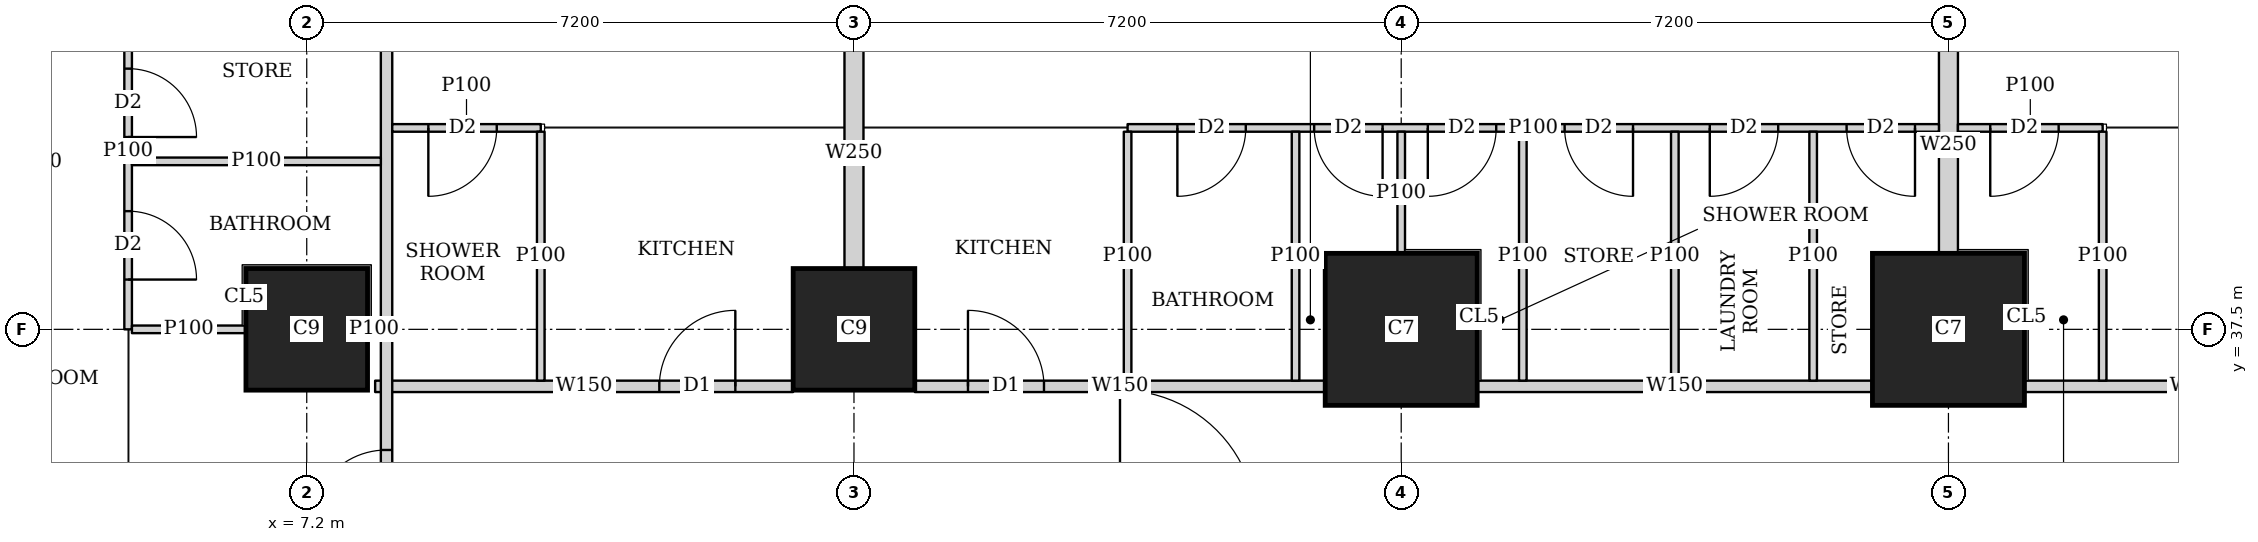
"""IFC4 building model, lengths in metres.
Left out: names, types, materials, properties, quantities, classifications, styles, units other than length and angle.
Written with IfcOpenShell. Run it as: python <this file> out.ifc"""

import sys

from ifc_helpers import new_model, si_unit, direction, frame, frame_2d, origin, origin_2d, place, context, subcontext, project, spatial, rectangle, extrude, element, fill, save


model = new_model("IFC4")
c1 = context("Model", 3, precision=1e-05, world=origin(), true_north=direction((0.0, 1.0)))
c2 = subcontext(c1, "Body", "Model", "MODEL_VIEW")
j1 = project(units=[si_unit("LENGTHUNIT", "METRE"), si_unit("PLANEANGLEUNIT", "RADIAN")], contexts=[c1])
p1 = place(None, origin())
s1 = spatial("IfcSite", under=j1, at=p1, CompositionType="ELEMENT")
p2 = place(p1, origin())
s2 = spatial("IfcBuilding", under=s1, at=p2, CompositionType="ELEMENT")
p3 = place(p2, frame((0.0, 0.0, 77.9)))
s3 = spatial("IfcBuildingStorey", under=s2, at=p3, CompositionType="ELEMENT", Elevation=77.9)
for number, where, z_axis, x_axis in (
    (1, (7.2, 37.5, 0.0), (0.0, 0.0, 1.0), (1.0, 0.0, 0.0)),
    (2, (14.4, 37.5, 0.0), (0.0, 0.0, 1.0), (1.0, 0.0, 0.0)),
):
    element("IfcColumn", number, at=place(p3, frame(where, z_axis=z_axis, x_axis=x_axis)), inside=s3, PredefinedType="COLUMN", context=c2, shape_type="SweptSolid", body=[
        extrude(rectangle(XDim=1.6, YDim=1.6, at=origin_2d()), origin(), (0.0, 0.0, 1.0), 3.75),
    ])
for number, where, z_axis, x_axis in (
    (3, (21.6, 37.5, 0.0), (0.0, 0.0, 1.0), (1.0, 0.0, 0.0)),
    (4, (28.8, 37.5, 0.0), (0.0, 0.0, 1.0), (1.0, 0.0, 0.0)),
):
    element("IfcColumn", number, at=place(p3, frame(where, z_axis=z_axis, x_axis=x_axis)), inside=s3, PredefinedType="COLUMN", context=c2, shape_type="SweptSolid", body=[
        extrude(rectangle(XDim=2.0, YDim=2.0, at=origin_2d()), origin(), (0.0, 0.0, 1.0), 3.75),
    ])
p4 = place(p3, frame((8.25, 2.126, 0.0), z_axis=(0.0, 0.0, 1.0), x_axis=(0.0, 1.0, 0.0)))
e5 = element("IfcWall", 5, at=p4, inside=s3, PredefinedType="SOLIDWALL", context=c2, shape_type="SweptSolid", body=[
    extrude(rectangle(XDim=40.773, YDim=0.15, at=frame_2d((20.386, 0.0))), origin(), (0.0, 0.0, 1.0), 3.5),
])
p5 = place(p4, frame((17.787, 0.0, 0.0)))
e6 = element("IfcOpeningElement", 6, at=p5, cuts=e5, PredefinedType="OPENING", context=c2, shape_type="SweptSolid", body=[
    extrude(rectangle(XDim=1.0, YDim=2.1, at=frame_2d((0.5, 1.05))), frame((0.0, 0.085, 0.0), z_axis=(0.0, -1.0, 0.0), x_axis=(1.0, 0.0, 0.0)), (0.0, 0.0, 1.0), 0.17),
])
p6 = place(p4, frame((21.962, 0.0, 0.0)))
e7 = element("IfcOpeningElement", 7, at=p6, cuts=e5, PredefinedType="OPENING", context=c2, shape_type="SweptSolid", body=[
    extrude(rectangle(XDim=1.0, YDim=2.1, at=frame_2d((0.5, 1.05))), frame((0.0, 0.085, 0.0), z_axis=(0.0, -1.0, 0.0), x_axis=(1.0, 0.0, 0.0)), (0.0, 0.0, 1.0), 0.17),
])
p7 = place(p4, frame((32.787, 0.0, 0.0)))
e8 = element("IfcOpeningElement", 8, at=p7, cuts=e5, PredefinedType="OPENING", context=c2, shape_type="SweptSolid", body=[
    extrude(rectangle(XDim=1.0, YDim=2.1, at=frame_2d((0.5, 1.05))), frame((0.0, 0.085, 0.0), z_axis=(0.0, -1.0, 0.0), x_axis=(1.0, 0.0, 0.0)), (0.0, 0.0, 1.0), 0.17),
])
p8 = place(p3, frame((8.1, 36.75, 0.0), z_axis=(0.0, 0.0, 1.0), x_axis=(1.0, 0.0, 0.0)))
e9 = element("IfcWall", 9, at=p8, inside=s3, PredefinedType="SOLIDWALL", context=c2, shape_type="SweptSolid", body=[
    extrude(rectangle(XDim=5.499, YDim=0.15, at=frame_2d((2.75, 0.0))), origin(), (0.0, 0.0, 1.0), 3.5),
])
p9 = place(p8, frame((3.739, 0.0, 0.0)))
e10 = element("IfcOpeningElement", 10, at=p9, cuts=e9, PredefinedType="OPENING", context=c2, shape_type="SweptSolid", body=[
    extrude(rectangle(XDim=1.0, YDim=2.1, at=frame_2d((0.5, 1.05))), frame((0.0, 0.085, 0.0), z_axis=(0.0, -1.0, 0.0), x_axis=(1.0, 0.0, 0.0)), (0.0, 0.0, 1.0), 0.17),
])
p10 = place(p3, frame((15.201, 36.75, 0.0), z_axis=(0.0, 0.0, 1.0), x_axis=(1.0, 0.0, 0.0)))
e11 = element("IfcWall", 11, at=p10, inside=s3, PredefinedType="SOLIDWALL", context=c2, shape_type="SweptSolid", body=[
    extrude(rectangle(XDim=5.398, YDim=0.15, at=frame_2d((2.699, 0.0))), origin(), (0.0, 0.0, 1.0), 3.5),
])
p11 = place(p10, frame((0.699, 0.0, 0.0)))
e12 = element("IfcOpeningElement", 12, at=p11, cuts=e11, PredefinedType="OPENING", context=c2, shape_type="SweptSolid", body=[
    extrude(rectangle(XDim=1.0, YDim=2.1, at=frame_2d((0.5, 1.05))), frame((0.0, 0.085, 0.0), z_axis=(0.0, -1.0, 0.0), x_axis=(1.0, 0.0, 0.0)), (0.0, 0.0, 1.0), 0.17),
])
p12 = place(p3, frame((22.601, 36.75, 0.0), z_axis=(0.0, 0.0, 1.0), x_axis=(1.0, 0.0, 0.0)))
e13 = element("IfcWall", 13, at=p12, inside=s3, PredefinedType="SOLIDWALL", context=c2, shape_type="SweptSolid", body=[
    extrude(rectangle(XDim=5.198, YDim=0.15, at=frame_2d((2.599, 0.0))), origin(), (0.0, 0.0, 1.0), 3.5),
])
p13 = place(p3, frame((29.801, 36.75, 0.0), z_axis=(0.0, 0.0, 1.0), x_axis=(1.0, 0.0, 0.0)))
e14 = element("IfcWall", 14, at=p13, inside=s3, PredefinedType="SOLIDWALL", context=c2, shape_type="SweptSolid", body=[
    extrude(rectangle(XDim=5.172, YDim=0.15, at=frame_2d((2.586, 0.0))), origin(), (0.0, 0.0, 1.0), 3.5),
])
p14 = place(p13, frame((2.645, 0.0, 0.0)))
e15 = element("IfcOpeningElement", 15, at=p14, cuts=e14, PredefinedType="OPENING", context=c2, shape_type="SweptSolid", body=[
    extrude(rectangle(XDim=1.0, YDim=2.1, at=frame_2d((0.5, 1.05))), frame((0.0, 0.085, 0.0), z_axis=(0.0, -1.0, 0.0), x_axis=(1.0, 0.0, 0.0)), (0.0, 0.0, 1.0), 0.17),
])
p15 = place(p3, frame((4.85, 37.5, 0.0), z_axis=(0.0, 0.0, 1.0), x_axis=(0.0, 1.0, 0.0)))
e16 = element("IfcWall", 16, at=p15, inside=s3, PredefinedType="PARTITIONING", context=c2, shape_type="SweptSolid", body=[
    extrude(rectangle(XDim=4.699, YDim=0.1, at=frame_2d((2.35, 0.0))), origin(), (0.0, 0.0, 1.0), 3.5),
])
p16 = place(p15, frame((0.655, 0.0, 0.0)))
e17 = element("IfcOpeningElement", 17, at=p16, cuts=e16, PredefinedType="OPENING", context=c2, shape_type="SweptSolid", body=[
    extrude(rectangle(XDim=0.9, YDim=2.1, at=frame_2d((0.45, 1.05))), frame((0.0, 0.06, 0.0), z_axis=(0.0, -1.0, 0.0), x_axis=(1.0, 0.0, 0.0)), (0.0, 0.0, 1.0), 0.12),
])
p17 = place(p15, frame((2.53, 0.0, 0.0)))
e18 = element("IfcOpeningElement", 18, at=p17, cuts=e16, PredefinedType="OPENING", context=c2, shape_type="SweptSolid", body=[
    extrude(rectangle(XDim=0.9, YDim=2.1, at=frame_2d((0.45, 1.05))), frame((0.0, 0.06, 0.0), z_axis=(0.0, -1.0, 0.0), x_axis=(1.0, 0.0, 0.0)), (0.0, 0.0, 1.0), 0.12),
])
p18 = place(p3, frame((4.9, 37.5, 0.0), z_axis=(0.0, 0.0, 1.0), x_axis=(1.0, 0.0, 0.0)))
e19 = element("IfcWall", 19, at=p18, inside=s3, PredefinedType="PARTITIONING", context=c2, shape_type="SweptSolid", body=[
    extrude(rectangle(XDim=1.499, YDim=0.1, at=frame_2d((0.75, 0.0))), origin(), (0.0, 0.0, 1.0), 3.5),
])
p19 = place(p3, frame((8.001, 37.5, 0.0), z_axis=(0.0, 0.0, 1.0), x_axis=(1.0, 0.0, 0.0)))
e20 = element("IfcWall", 20, at=p19, inside=s3, PredefinedType="PARTITIONING", context=c2, shape_type="SweptSolid", body=[
    extrude(rectangle(XDim=0.174, YDim=0.1, at=frame_2d((0.087, 0.0))), origin(), (0.0, 0.0, 1.0), 3.5),
])
p20 = place(p3, frame((4.9, 39.71, 0.0), z_axis=(0.0, 0.0, 1.0), x_axis=(1.0, 0.0, 0.0)))
e21 = element("IfcWall", 21, at=p20, inside=s3, PredefinedType="PARTITIONING", context=c2, shape_type="SweptSolid", body=[
    extrude(rectangle(XDim=3.275, YDim=0.1, at=frame_2d((1.638, 0.0))), origin(), (0.0, 0.0, 1.0), 3.5),
])
p21 = place(p3, frame((8.325, 40.15, 0.0), z_axis=(0.0, 0.0, 1.0), x_axis=(1.0, 0.0, 0.0)))
e22 = element("IfcWall", 22, at=p21, inside=s3, PredefinedType="PARTITIONING", context=c2, shape_type="SweptSolid", body=[
    extrude(rectangle(XDim=1.954, YDim=0.1, at=frame_2d((0.977, 0.0))), origin(), (0.0, 0.0, 1.0), 3.5),
])
p22 = place(p21, frame((0.475, 0.0, 0.0)))
e23 = element("IfcOpeningElement", 23, at=p22, cuts=e22, PredefinedType="OPENING", context=c2, shape_type="SweptSolid", body=[
    extrude(rectangle(XDim=0.9, YDim=2.1, at=frame_2d((0.45, 1.05))), frame((0.0, 0.06, 0.0), z_axis=(0.0, -1.0, 0.0), x_axis=(1.0, 0.0, 0.0)), (0.0, 0.0, 1.0), 0.12),
])
p23 = place(p3, frame((10.279, 36.825, 0.0), z_axis=(0.0, 0.0, 1.0), x_axis=(0.0, 1.0, 0.0)))
e24 = element("IfcWall", 24, at=p23, inside=s3, PredefinedType="PARTITIONING", context=c2, shape_type="SweptSolid", body=[
    extrude(rectangle(XDim=3.275, YDim=0.1, at=frame_2d((1.638, 0.0))), origin(), (0.0, 0.0, 1.0), 3.5),
])
p24 = place(p3, frame((18.0, 40.15, 0.0), z_axis=(0.0, 0.0, 1.0), x_axis=(1.0, 0.0, 0.0)))
e25 = element("IfcWall", 25, at=p24, inside=s3, PredefinedType="PARTITIONING", context=c2, shape_type="SweptSolid", body=[
    extrude(rectangle(XDim=10.675, YDim=0.1, at=frame_2d((5.337, 0.0))), origin(), (0.0, 0.0, 1.0), 3.5),
])
p25 = place(p24, frame((0.655, 0.0, 0.0)))
e26 = element("IfcOpeningElement", 26, at=p25, cuts=e25, PredefinedType="OPENING", context=c2, shape_type="SweptSolid", body=[
    extrude(rectangle(XDim=0.9, YDim=2.1, at=frame_2d((0.45, 1.05))), frame((0.0, 0.06, 0.0), z_axis=(0.0, -1.0, 0.0), x_axis=(1.0, 0.0, 0.0)), (0.0, 0.0, 1.0), 0.12),
])
p26 = place(p24, frame((3.95, 0.0, 0.0)))
e27 = element("IfcOpeningElement", 27, at=p26, cuts=e25, PredefinedType="OPENING", context=c2, shape_type="SweptSolid", body=[
    extrude(rectangle(XDim=0.9, YDim=2.1, at=frame_2d((0.45, 1.05))), frame((0.0, 0.06, 0.0), z_axis=(0.0, -1.0, 0.0), x_axis=(1.0, 0.0, 0.0)), (0.0, 0.0, 1.0), 0.12),
])
p27 = place(p24, frame((7.66, 0.0, 0.0)))
e28 = element("IfcOpeningElement", 28, at=p27, cuts=e25, PredefinedType="OPENING", context=c2, shape_type="SweptSolid", body=[
    extrude(rectangle(XDim=0.9, YDim=2.1, at=frame_2d((0.45, 1.05))), frame((0.0, 0.06, 0.0), z_axis=(0.0, -1.0, 0.0), x_axis=(1.0, 0.0, 0.0)), (0.0, 0.0, 1.0), 0.12),
])
p28 = place(p24, frame((2.455, 0.0, 0.0)))
e29 = element("IfcOpeningElement", 29, at=p28, cuts=e25, PredefinedType="OPENING", context=c2, shape_type="SweptSolid", body=[
    extrude(rectangle(XDim=0.9, YDim=2.1, at=frame_2d((0.45, 1.05))), frame((0.0, 0.06, 0.0), z_axis=(0.0, -1.0, 0.0), x_axis=(1.0, 0.0, 0.0)), (0.0, 0.0, 1.0), 0.12),
])
p29 = place(p24, frame((5.75, 0.0, 0.0)))
e30 = element("IfcOpeningElement", 30, at=p29, cuts=e25, PredefinedType="OPENING", context=c2, shape_type="SweptSolid", body=[
    extrude(rectangle(XDim=0.9, YDim=2.1, at=frame_2d((0.45, 1.05))), frame((0.0, 0.06, 0.0), z_axis=(0.0, -1.0, 0.0), x_axis=(1.0, 0.0, 0.0)), (0.0, 0.0, 1.0), 0.12),
])
p30 = place(p24, frame((9.46, 0.0, 0.0)))
e31 = element("IfcOpeningElement", 31, at=p30, cuts=e25, PredefinedType="OPENING", context=c2, shape_type="SweptSolid", body=[
    extrude(rectangle(XDim=0.9, YDim=2.1, at=frame_2d((0.45, 1.05))), frame((0.0, 0.06, 0.0), z_axis=(0.0, -1.0, 0.0), x_axis=(1.0, 0.0, 0.0)), (0.0, 0.0, 1.0), 0.12),
])
p31 = place(p3, frame((18.0, 36.825, 0.0), z_axis=(0.0, 0.0, 1.0), x_axis=(0.0, 1.0, 0.0)))
e32 = element("IfcWall", 32, at=p31, inside=s3, PredefinedType="PARTITIONING", context=c2, shape_type="SweptSolid", body=[
    extrude(rectangle(XDim=3.275, YDim=0.1, at=frame_2d((1.638, 0.0))), origin(), (0.0, 0.0, 1.0), 3.5),
])
p32 = place(p3, frame((21.6, 38.501, 0.0), z_axis=(0.0, 0.0, 1.0), x_axis=(0.0, 1.0, 0.0)))
e33 = element("IfcWall", 33, at=p32, inside=s3, PredefinedType="PARTITIONING", context=c2, shape_type="SweptSolid", body=[
    extrude(rectangle(XDim=1.599, YDim=0.1, at=frame_2d((0.8, 0.0))), origin(), (0.0, 0.0, 1.0), 3.5),
])
for number, where, z_axis, x_axis in (
    (34, (25.2, 36.825, 0.0), (0.0, 0.0, 1.0), (0.0, 1.0, 0.0)),
    (35, (20.21, 36.825, 0.0), (0.0, 0.0, 1.0), (0.0, 1.0, 0.0)),
    (36, (23.2, 36.825, 0.0), (0.0, 0.0, 1.0), (0.0, 1.0, 0.0)),
    (37, (27.02, 36.825, 0.0), (0.0, 0.0, 1.0), (0.0, 1.0, 0.0)),
):
    element("IfcWall", number, at=place(p3, frame(where, z_axis=z_axis, x_axis=x_axis)), inside=s3, PredefinedType="PARTITIONING", context=c2, shape_type="SweptSolid", body=[
        extrude(rectangle(XDim=3.275, YDim=0.1, at=frame_2d((1.638, 0.0))), origin(), (0.0, 0.0, 1.0), 3.5),
    ])
p33 = place(p3, frame((14.4, 38.301, 0.0), z_axis=(0.0, 0.0, 1.0), x_axis=(0.0, 1.0, 0.0)))
e38 = element("IfcWall", 38, at=p33, inside=s3, PredefinedType="SOLIDWALL", context=c2, shape_type="SweptSolid", body=[
    extrude(rectangle(XDim=3.049, YDim=0.25, at=frame_2d((1.524, 0.0))), origin(), (0.0, 0.0, 1.0), 3.5),
])
p34 = place(p3, frame((28.925, 40.15, 0.0), z_axis=(0.0, 0.0, 1.0), x_axis=(1.0, 0.0, 0.0)))
e39 = element("IfcWall", 39, at=p34, inside=s3, PredefinedType="PARTITIONING", context=c2, shape_type="SweptSolid", body=[
    extrude(rectangle(XDim=1.904, YDim=0.1, at=frame_2d((0.952, 0.0))), origin(), (0.0, 0.0, 1.0), 3.5),
])
p35 = place(p34, frame((0.425, 0.0, 0.0)))
e40 = element("IfcOpeningElement", 40, at=p35, cuts=e39, PredefinedType="OPENING", context=c2, shape_type="SweptSolid", body=[
    extrude(rectangle(XDim=0.9, YDim=2.1, at=frame_2d((0.45, 1.05))), frame((0.0, 0.06, 0.0), z_axis=(0.0, -1.0, 0.0), x_axis=(1.0, 0.0, 0.0)), (0.0, 0.0, 1.0), 0.12),
])
p36 = place(p3, frame((30.829, 36.825, 0.0), z_axis=(0.0, 0.0, 1.0), x_axis=(0.0, 1.0, 0.0)))
e41 = element("IfcWall", 41, at=p36, inside=s3, PredefinedType="PARTITIONING", context=c2, shape_type="SweptSolid", body=[
    extrude(rectangle(XDim=3.275, YDim=0.1, at=frame_2d((1.638, 0.0))), origin(), (0.0, 0.0, 1.0), 3.5),
])
p37 = place(p3, frame((28.8, 38.501, 0.0), z_axis=(0.0, 0.0, 1.0), x_axis=(0.0, 1.0, 0.0)))
e42 = element("IfcWall", 42, at=p37, inside=s3, PredefinedType="SOLIDWALL", context=c2, shape_type="SweptSolid", body=[
    extrude(rectangle(XDim=2.849, YDim=0.25, at=frame_2d((1.425, 0.0))), origin(), (0.0, 0.0, 1.0), 3.5),
])
p38 = place(p16, origin())
e43 = element("IfcDoor", 43, at=p38, inside=s3, OperationType="SINGLE_SWING_RIGHT", PredefinedType="DOOR", context=c2, shape_type="SweptSolid", body=[
    extrude(rectangle(XDim=0.9, YDim=2.1, at=frame_2d((0.45, 1.05))), frame((0.0, 0.025, 0.0), z_axis=(0.0, -1.0, 0.0), x_axis=(1.0, 0.0, 0.0)), (0.0, 0.0, 1.0), 0.05),
])
fill(e17, e43)
p39 = place(p17, origin())
e44 = element("IfcDoor", 44, at=p39, inside=s3, OperationType="SINGLE_SWING_RIGHT", PredefinedType="DOOR", context=c2, shape_type="SweptSolid", body=[
    extrude(rectangle(XDim=0.9, YDim=2.1, at=frame_2d((0.45, 1.05))), frame((0.0, 0.025, 0.0), z_axis=(0.0, -1.0, 0.0), x_axis=(1.0, 0.0, 0.0)), (0.0, 0.0, 1.0), 0.05),
])
fill(e18, e44)
p40 = place(p7, origin())
e45 = element("IfcDoor", 45, at=p40, inside=s3, OperationType="SINGLE_SWING_LEFT", PredefinedType="DOOR", context=c2, shape_type="SweptSolid", body=[
    extrude(rectangle(XDim=1.0, YDim=2.1, at=frame_2d((0.5, 1.05))), frame((0.0, 0.025, 0.0), z_axis=(0.0, -1.0, 0.0), x_axis=(1.0, 0.0, 0.0)), (0.0, 0.0, 1.0), 0.05),
])
fill(e8, e45)
p41 = place(p22, origin())
e46 = element("IfcDoor", 46, at=p41, inside=s3, OperationType="SINGLE_SWING_RIGHT", PredefinedType="DOOR", context=c2, shape_type="SweptSolid", body=[
    extrude(rectangle(XDim=0.9, YDim=2.1, at=frame_2d((0.45, 1.05))), frame((0.0, 0.025, 0.0), z_axis=(0.0, -1.0, 0.0), x_axis=(1.0, 0.0, 0.0)), (0.0, 0.0, 1.0), 0.05),
])
fill(e23, e46)
p42 = place(p9, origin())
e47 = element("IfcDoor", 47, at=p42, inside=s3, OperationType="SINGLE_SWING_RIGHT", PredefinedType="DOOR", context=c2, shape_type="SweptSolid", body=[
    extrude(rectangle(XDim=1.0, YDim=2.1, at=frame_2d((0.5, 1.05))), frame((0.0, 0.025, 0.0), z_axis=(0.0, -1.0, 0.0), x_axis=(1.0, 0.0, 0.0)), (0.0, 0.0, 1.0), 0.05),
])
fill(e10, e47)
p43 = place(p25, origin())
e48 = element("IfcDoor", 48, at=p43, inside=s3, OperationType="SINGLE_SWING_RIGHT", PredefinedType="DOOR", context=c2, shape_type="SweptSolid", body=[
    extrude(rectangle(XDim=0.9, YDim=2.1, at=frame_2d((0.45, 1.05))), frame((0.0, 0.025, 0.0), z_axis=(0.0, -1.0, 0.0), x_axis=(1.0, 0.0, 0.0)), (0.0, 0.0, 1.0), 0.05),
])
fill(e26, e48)
p44 = place(p26, origin())
e49 = element("IfcDoor", 49, at=p44, inside=s3, OperationType="SINGLE_SWING_RIGHT", PredefinedType="DOOR", context=c2, shape_type="SweptSolid", body=[
    extrude(rectangle(XDim=0.9, YDim=2.1, at=frame_2d((0.45, 1.05))), frame((0.0, 0.025, 0.0), z_axis=(0.0, -1.0, 0.0), x_axis=(1.0, 0.0, 0.0)), (0.0, 0.0, 1.0), 0.05),
])
fill(e27, e49)
p45 = place(p27, origin())
e50 = element("IfcDoor", 50, at=p45, inside=s3, OperationType="SINGLE_SWING_RIGHT", PredefinedType="DOOR", context=c2, shape_type="SweptSolid", body=[
    extrude(rectangle(XDim=0.9, YDim=2.1, at=frame_2d((0.45, 1.05))), frame((0.0, 0.025, 0.0), z_axis=(0.0, -1.0, 0.0), x_axis=(1.0, 0.0, 0.0)), (0.0, 0.0, 1.0), 0.05),
])
fill(e28, e50)
p46 = place(p28, origin())
e51 = element("IfcDoor", 51, at=p46, inside=s3, OperationType="SINGLE_SWING_LEFT", PredefinedType="DOOR", context=c2, shape_type="SweptSolid", body=[
    extrude(rectangle(XDim=0.9, YDim=2.1, at=frame_2d((0.45, 1.05))), frame((0.0, 0.025, 0.0), z_axis=(0.0, -1.0, 0.0), x_axis=(1.0, 0.0, 0.0)), (0.0, 0.0, 1.0), 0.05),
])
fill(e29, e51)
p47 = place(p29, origin())
e52 = element("IfcDoor", 52, at=p47, inside=s3, OperationType="SINGLE_SWING_LEFT", PredefinedType="DOOR", context=c2, shape_type="SweptSolid", body=[
    extrude(rectangle(XDim=0.9, YDim=2.1, at=frame_2d((0.45, 1.05))), frame((0.0, 0.025, 0.0), z_axis=(0.0, -1.0, 0.0), x_axis=(1.0, 0.0, 0.0)), (0.0, 0.0, 1.0), 0.05),
])
fill(e30, e52)
p48 = place(p30, origin())
e53 = element("IfcDoor", 53, at=p48, inside=s3, OperationType="SINGLE_SWING_LEFT", PredefinedType="DOOR", context=c2, shape_type="SweptSolid", body=[
    extrude(rectangle(XDim=0.9, YDim=2.1, at=frame_2d((0.45, 1.05))), frame((0.0, 0.025, 0.0), z_axis=(0.0, -1.0, 0.0), x_axis=(1.0, 0.0, 0.0)), (0.0, 0.0, 1.0), 0.05),
])
fill(e31, e53)
p49 = place(p11, origin())
e54 = element("IfcDoor", 54, at=p49, inside=s3, OperationType="SINGLE_SWING_LEFT", PredefinedType="DOOR", context=c2, shape_type="SweptSolid", body=[
    extrude(rectangle(XDim=1.0, YDim=2.1, at=frame_2d((0.5, 1.05))), frame((0.0, 0.025, 0.0), z_axis=(0.0, -1.0, 0.0), x_axis=(1.0, 0.0, 0.0)), (0.0, 0.0, 1.0), 0.05),
])
fill(e12, e54)
p50 = place(p35, origin())
e55 = element("IfcDoor", 55, at=p50, inside=s3, OperationType="SINGLE_SWING_RIGHT", PredefinedType="DOOR", context=c2, shape_type="SweptSolid", body=[
    extrude(rectangle(XDim=0.9, YDim=2.1, at=frame_2d((0.45, 1.05))), frame((0.0, 0.025, 0.0), z_axis=(0.0, -1.0, 0.0), x_axis=(1.0, 0.0, 0.0)), (0.0, 0.0, 1.0), 0.05),
])
fill(e40, e55)
save(model, sys.argv[1])
